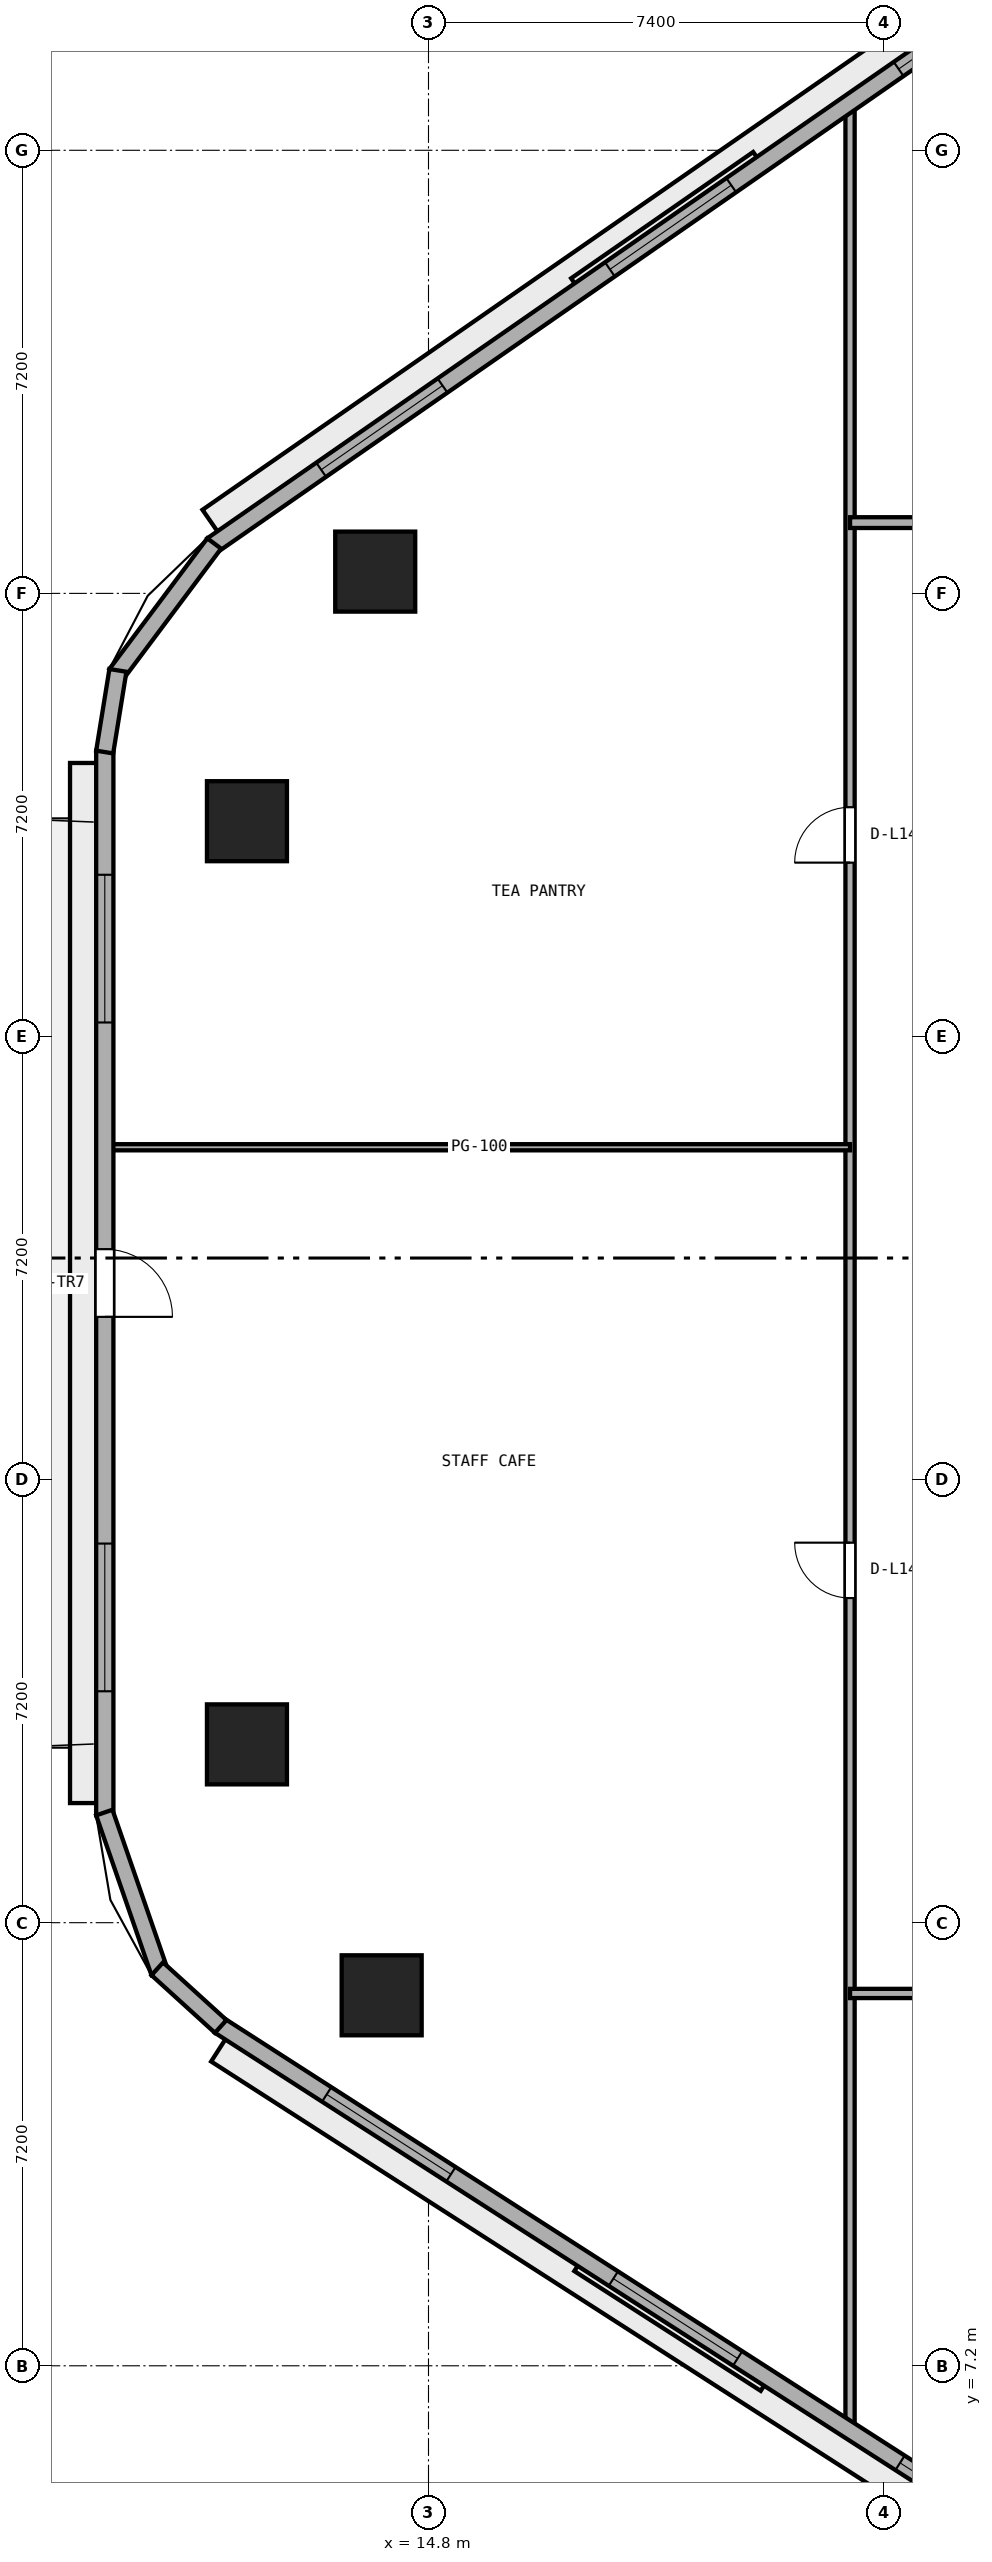
"""IFC4 building model, lengths in metres.
Left out: names, types, materials, properties, quantities, classifications, styles, units other than length and angle.
Written with IfcOpenShell. Run it as: python <this file> out.ifc"""

import sys

from ifc_helpers import new_model, si_unit, direction, frame, frame_2d, origin, origin_2d, place, context, subcontext, project, spatial, rectangle, extrude, element, fill, save


model = new_model("IFC4")
c1 = context("Model", 3, precision=1e-05, world=origin(), true_north=direction((0.0, 1.0)))
c2 = subcontext(c1, "Body", "Model", "MODEL_VIEW")
j1 = project(units=[si_unit("LENGTHUNIT", "METRE"), si_unit("PLANEANGLEUNIT", "RADIAN")], contexts=[c1])
p1 = place(None, origin())
s1 = spatial("IfcSite", under=j1, at=p1, CompositionType="ELEMENT")
p2 = place(p1, origin())
s2 = spatial("IfcBuilding", under=s1, at=p2, CompositionType="ELEMENT")
p3 = place(p2, frame((0.0, 0.0, 59.2)))
s3 = spatial("IfcBuildingStorey", under=s2, at=p3, CompositionType="ELEMENT", Elevation=59.2)
for number, where, z_axis, x_axis in (
    (1, (13.934, 36.354, 0.0), (0.0, 0.0, 1.0), (1.0, 0.0, 0.0)),
    (2, (11.85, 32.298, 0.0), (0.0, 0.0, 1.0), (1.0, 0.0, 0.0)),
    (3, (11.85, 17.298, 0.0), (0.0, 0.0, 1.0), (1.0, 0.0, 0.0)),
    (4, (14.039, 13.22, 0.0), (0.0, 0.0, 1.0), (1.0, 0.0, 0.0)),
):
    element("IfcColumn", number, at=place(p3, frame(where, z_axis=z_axis, x_axis=x_axis)), inside=s3, PredefinedType="COLUMN", context=c2, shape_type="SweptSolid", body=[
        extrude(rectangle(XDim=1.3, YDim=1.3, at=origin_2d()), origin(), (0.0, 0.0, 1.0), 3.8),
    ])
p4 = place(p3, frame((21.65, 6.119, 0.0), z_axis=(0.0, 0.0, 1.0), x_axis=(0.0, 1.0, 0.0)))
e5 = element("IfcWall", 5, at=p4, inside=s3, PredefinedType="PARTITIONING", context=c2, shape_type="SweptSolid", body=[
    extrude(rectangle(XDim=37.884, YDim=0.15, at=frame_2d((18.942, 0.0))), origin(), (0.0, 0.0, 1.0), 3.525),
])
p5 = place(p4, frame((13.556, 0.0, 0.0)))
e6 = element("IfcOpeningElement", 6, at=p5, cuts=e5, PredefinedType="OPENING", context=c2, shape_type="SweptSolid", body=[
    extrude(rectangle(XDim=0.9, YDim=2.1, at=frame_2d((0.45, 1.05))), frame((0.0, 0.085, 0.0), z_axis=(0.0, -1.0, 0.0), x_axis=(1.0, 0.0, 0.0)), (0.0, 0.0, 1.0), 0.17),
])
p6 = place(p4, frame((25.506, 0.0, 0.0)))
e7 = element("IfcOpeningElement", 7, at=p6, cuts=e5, PredefinedType="OPENING", context=c2, shape_type="SweptSolid", body=[
    extrude(rectangle(XDim=0.9, YDim=2.1, at=frame_2d((0.45, 1.05))), frame((0.0, 0.085, 0.0), z_axis=(0.0, -1.0, 0.0), x_axis=(1.0, 0.0, 0.0)), (0.0, 0.0, 1.0), 0.17),
])
p7 = place(p3, frame((21.65, 13.25, 0.0), z_axis=(0.0, 0.0, 1.0), x_axis=(1.0, 0.0, 0.0)))
e8 = element("IfcWall", 8, at=p7, inside=s3, PredefinedType="PARTITIONING", context=c2, shape_type="SweptSolid", body=[
    extrude(rectangle(XDim=30.7, YDim=0.15, at=frame_2d((15.35, 0.0))), origin(), (0.0, 0.0, 1.0), 3.525),
])
p8 = place(p7, frame((3.695, 0.0, 0.0)))
e9 = element("IfcOpeningElement", 9, at=p8, cuts=e8, PredefinedType="OPENING", context=c2, shape_type="SweptSolid", body=[
    extrude(rectangle(XDim=0.9, YDim=2.1, at=frame_2d((0.45, 1.05))), frame((0.0, 0.085, 0.0), z_axis=(0.0, -1.0, 0.0), x_axis=(1.0, 0.0, 0.0)), (0.0, 0.0, 1.0), 0.17),
])
p9 = place(p7, frame((11.95, 0.0, 0.0)))
e10 = element("IfcOpeningElement", 10, at=p9, cuts=e8, PredefinedType="OPENING", context=c2, shape_type="SweptSolid", body=[
    extrude(rectangle(XDim=0.9, YDim=2.1, at=frame_2d((0.45, 1.05))), frame((0.0, 0.085, 0.0), z_axis=(0.0, -1.0, 0.0), x_axis=(1.0, 0.0, 0.0)), (0.0, 0.0, 1.0), 0.17),
])
p10 = place(p7, frame((20.45, 0.0, 0.0)))
e11 = element("IfcOpeningElement", 11, at=p10, cuts=e8, PredefinedType="OPENING", context=c2, shape_type="SweptSolid", body=[
    extrude(rectangle(XDim=0.9, YDim=2.1, at=frame_2d((0.45, 1.05))), frame((0.0, 0.085, 0.0), z_axis=(0.0, -1.0, 0.0), x_axis=(1.0, 0.0, 0.0)), (0.0, 0.0, 1.0), 0.17),
])
p11 = place(p7, frame((27.305, 0.0, 0.0)))
e12 = element("IfcOpeningElement", 12, at=p11, cuts=e8, PredefinedType="OPENING", context=c2, shape_type="SweptSolid", body=[
    extrude(rectangle(XDim=0.9, YDim=2.1, at=frame_2d((0.45, 1.05))), frame((0.0, 0.085, 0.0), z_axis=(0.0, -1.0, 0.0), x_axis=(1.0, 0.0, 0.0)), (0.0, 0.0, 1.0), 0.17),
])
p12 = place(p3, frame((9.605, 27.0, 0.0), z_axis=(0.0, 0.0, 1.0), x_axis=(1.0, 0.0, 0.0)))
e13 = element("IfcWall", 13, at=p12, inside=s3, PredefinedType="PARTITIONING", context=c2, shape_type="SweptSolid", body=[
    extrude(rectangle(XDim=12.045, YDim=0.1, at=frame_2d((6.022, 0.0))), origin(), (0.0, 0.0, 1.0), 3.525),
])
p13 = place(p3, frame((21.65, 37.15, 0.0), z_axis=(0.0, 0.0, 1.0), x_axis=(1.0, 0.0, 0.0)))
e14 = element("IfcWall", 14, at=p13, inside=s3, PredefinedType="PARTITIONING", context=c2, shape_type="SweptSolid", body=[
    extrude(rectangle(XDim=30.7, YDim=0.175, at=frame_2d((15.35, 0.0))), origin(), (0.0, 0.0, 1.0), 3.525),
])
p14 = place(p13, frame((3.795, 0.0, 0.0)))
e15 = element("IfcOpeningElement", 15, at=p14, cuts=e14, PredefinedType="OPENING", context=c2, shape_type="SweptSolid", body=[
    extrude(rectangle(XDim=1.0, YDim=2.12, at=frame_2d((0.5, 1.06))), frame((0.0, 0.097, 0.0), z_axis=(0.0, -1.0, 0.0), x_axis=(1.0, 0.0, 0.0)), (0.0, 0.0, 1.0), 0.195),
])
p15 = place(p13, frame((18.905, 0.0, 0.0)))
e16 = element("IfcOpeningElement", 16, at=p15, cuts=e14, PredefinedType="OPENING", context=c2, shape_type="SweptSolid", body=[
    extrude(rectangle(XDim=1.0, YDim=2.12, at=frame_2d((0.5, 1.06))), frame((0.0, 0.097, 0.0), z_axis=(0.0, -1.0, 0.0), x_axis=(1.0, 0.0, 0.0)), (0.0, 0.0, 1.0), 0.195),
])
p16 = place(p3, frame((26.182, 47.118, 0.0), z_axis=(0.0, 0.0, 1.0), x_axis=(-0.821547956627, -0.570139417127, 0.0)))
e17 = element("IfcWall", 17, at=p16, inside=s3, PredefinedType="STANDARD", context=c2, shape_type="SweptSolid", body=[
    extrude(rectangle(XDim=18.132, YDim=0.28, at=frame_2d((9.066, 0.0))), origin(), (0.0, 0.0, 1.0), 3.525),
])
p17 = place(p16, frame((2.156, 0.0, 0.9)))
e18 = element("IfcOpeningElement", 18, at=p17, cuts=e17, PredefinedType="OPENING", context=c2, shape_type="SweptSolid", body=[
    extrude(rectangle(XDim=2.4, YDim=1.75, at=frame_2d((1.2, 0.875))), frame((0.0, 0.15, 0.0), z_axis=(0.0, -1.0, 0.0), x_axis=(1.0, 0.0, 0.0)), (0.0, 0.0, 1.0), 0.3),
])
p18 = place(p16, frame((7.866, 0.0, 0.9)))
e19 = element("IfcOpeningElement", 19, at=p18, cuts=e17, PredefinedType="OPENING", context=c2, shape_type="SweptSolid", body=[
    extrude(rectangle(XDim=2.4, YDim=1.75, at=frame_2d((1.2, 0.875))), frame((0.0, 0.15, 0.0), z_axis=(0.0, -1.0, 0.0), x_axis=(1.0, 0.0, 0.0)), (0.0, 0.0, 1.0), 0.3),
])
p19 = place(p16, frame((13.577, 0.0, 0.9)))
e20 = element("IfcOpeningElement", 20, at=p19, cuts=e17, PredefinedType="OPENING", context=c2, shape_type="SweptSolid", body=[
    extrude(rectangle(XDim=2.4, YDim=1.75, at=frame_2d((1.2, 0.875))), frame((0.0, 0.15, 0.0), z_axis=(0.0, -1.0, 0.0), x_axis=(1.0, 0.0, 0.0)), (0.0, 0.0, 1.0), 0.3),
])
p20 = place(p3, frame((9.54, 33.444, 0.0), z_axis=(0.0, 0.0, 1.0), x_axis=(0.0, -1.0, 0.0)))
e21 = element("IfcWall", 21, at=p20, inside=s3, PredefinedType="STANDARD", context=c2, shape_type="SweptSolid", body=[
    extrude(rectangle(XDim=17.301, YDim=0.28, at=frame_2d((8.65, 0.0))), origin(), (0.0, 0.0, 1.0), 3.525),
])
p21 = place(p20, frame((8.1, 0.0, 0.0)))
e22 = element("IfcOpeningElement", 22, at=p21, cuts=e21, PredefinedType="OPENING", context=c2, shape_type="SweptSolid", body=[
    extrude(rectangle(XDim=1.1, YDim=2.2, at=frame_2d((0.55, 1.1))), frame((0.0, 0.15, 0.0), z_axis=(0.0, -1.0, 0.0), x_axis=(1.0, 0.0, 0.0)), (0.0, 0.0, 1.0), 0.3),
])
p22 = place(p20, frame((2.017, 0.0, 0.9)))
e23 = element("IfcOpeningElement", 23, at=p22, cuts=e21, PredefinedType="OPENING", context=c2, shape_type="SweptSolid", body=[
    extrude(rectangle(XDim=2.4, YDim=1.75, at=frame_2d((1.2, 0.875))), frame((0.0, 0.15, 0.0), z_axis=(0.0, -1.0, 0.0), x_axis=(1.0, 0.0, 0.0)), (0.0, 0.0, 1.0), 0.3),
])
p23 = place(p20, frame((12.884, 0.0, 0.9)))
e24 = element("IfcOpeningElement", 24, at=p23, cuts=e21, PredefinedType="OPENING", context=c2, shape_type="SweptSolid", body=[
    extrude(rectangle(XDim=2.4, YDim=1.75, at=frame_2d((1.2, 0.875))), frame((0.0, 0.15, 0.0), z_axis=(0.0, -1.0, 0.0), x_axis=(1.0, 0.0, 0.0)), (0.0, 0.0, 1.0), 0.3),
])
p24 = place(p3, frame((11.405, 12.728, 0.0), z_axis=(0.0, 0.0, 1.0), x_axis=(0.841304564637, -0.540561402175, 0.0)))
e25 = element("IfcWall", 25, at=p24, inside=s3, PredefinedType="STANDARD", context=c2, shape_type="SweptSolid", body=[
    extrude(rectangle(XDim=17.612, YDim=0.28, at=frame_2d((8.806, 0.0))), origin(), (0.0, 0.0, 1.0), 3.525),
])
p25 = place(p24, frame((2.069, 0.0, 0.9)))
e26 = element("IfcOpeningElement", 26, at=p25, cuts=e25, PredefinedType="OPENING", context=c2, shape_type="SweptSolid", body=[
    extrude(rectangle(XDim=2.4, YDim=1.75, at=frame_2d((1.2, 0.875))), frame((0.0, 0.15, 0.0), z_axis=(0.0, -1.0, 0.0), x_axis=(1.0, 0.0, 0.0)), (0.0, 0.0, 1.0), 0.3),
])
p26 = place(p24, frame((7.606, 0.0, 0.9)))
e27 = element("IfcOpeningElement", 27, at=p26, cuts=e25, PredefinedType="OPENING", context=c2, shape_type="SweptSolid", body=[
    extrude(rectangle(XDim=2.4, YDim=1.75, at=frame_2d((1.2, 0.875))), frame((0.0, 0.15, 0.0), z_axis=(0.0, -1.0, 0.0), x_axis=(1.0, 0.0, 0.0)), (0.0, 0.0, 1.0), 0.3),
])
p27 = place(p24, frame((13.143, 0.0, 0.9)))
e28 = element("IfcOpeningElement", 28, at=p27, cuts=e25, PredefinedType="OPENING", context=c2, shape_type="SweptSolid", body=[
    extrude(rectangle(XDim=2.4, YDim=1.75, at=frame_2d((1.2, 0.875))), frame((0.0, 0.15, 0.0), z_axis=(0.0, -1.0, 0.0), x_axis=(1.0, 0.0, 0.0)), (0.0, 0.0, 1.0), 0.3),
])
p28 = place(p3, frame((11.318, 36.811, 0.0), z_axis=(0.0, 0.0, 1.0), x_axis=(-0.599455152629, -0.800408345775, 0.0)))
e29 = element("IfcWall", 29, at=p28, inside=s3, PredefinedType="STANDARD", context=c2, shape_type="SweptSolid", body=[
    extrude(rectangle(XDim=2.653, YDim=0.28, at=frame_2d((1.327, 0.0))), origin(), (0.0, 0.0, 1.0), 3.525),
])
p29 = place(p3, frame((9.753, 34.749, 0.0), z_axis=(0.0, 0.0, 1.0), x_axis=(-0.160037671962, -0.987110907423, 0.0)))
e30 = element("IfcWall", 30, at=p29, inside=s3, PredefinedType="STANDARD", context=c2, shape_type="SweptSolid", body=[
    extrude(rectangle(XDim=1.344, YDim=0.28, at=frame_2d((0.672, 0.0))), origin(), (0.0, 0.0, 1.0), 3.525),
])
p30 = place(p3, frame((9.532, 16.189, 0.0), z_axis=(0.0, 0.0, 1.0), x_axis=(0.32708309668, -0.944995580871, 0.0)))
e31 = element("IfcWall", 31, at=p30, inside=s3, PredefinedType="STANDARD", context=c2, shape_type="SweptSolid", body=[
    extrude(rectangle(XDim=2.748, YDim=0.28, at=frame_2d((1.374, 0.0))), origin(), (0.0, 0.0, 1.0), 3.525),
])
p31 = place(p3, frame((10.393, 13.651, 0.0), z_axis=(0.0, 0.0, 1.0), x_axis=(0.74003521851, -0.672568119498, 0.0)))
e32 = element("IfcWall", 32, at=p31, inside=s3, PredefinedType="STANDARD", context=c2, shape_type="SweptSolid", body=[
    extrude(rectangle(XDim=1.393, YDim=0.28, at=frame_2d((0.697, 0.0))), origin(), (0.0, 0.0, 1.0), 3.525),
])
p32 = place(p5, origin())
e33 = element("IfcDoor", 33, at=p32, inside=s3, OperationType="SINGLE_SWING_RIGHT", PredefinedType="DOOR", context=c2, shape_type="SweptSolid", body=[
    extrude(rectangle(XDim=0.9, YDim=2.1, at=frame_2d((0.45, 1.05))), frame((0.0, 0.025, 0.0), z_axis=(0.0, -1.0, 0.0), x_axis=(1.0, 0.0, 0.0)), (0.0, 0.0, 1.0), 0.05),
])
fill(e6, e33)
p33 = place(p6, origin())
e34 = element("IfcDoor", 34, at=p33, inside=s3, OperationType="SINGLE_SWING_LEFT", PredefinedType="DOOR", context=c2, shape_type="SweptSolid", body=[
    extrude(rectangle(XDim=0.9, YDim=2.1, at=frame_2d((0.45, 1.05))), frame((0.0, 0.025, 0.0), z_axis=(0.0, -1.0, 0.0), x_axis=(1.0, 0.0, 0.0)), (0.0, 0.0, 1.0), 0.05),
])
fill(e7, e34)
p34 = place(p17, origin())
e35 = element("IfcWindow", 35, at=p34, inside=s3, PartitioningType="SINGLE_PANEL", PredefinedType="WINDOW", context=c2, shape_type="SweptSolid", body=[
    extrude(rectangle(XDim=2.4, YDim=1.75, at=frame_2d((1.2, 0.875))), frame((0.0, 0.03, 0.0), z_axis=(0.0, -1.0, 0.0), x_axis=(1.0, 0.0, 0.0)), (0.0, 0.0, 1.0), 0.06),
])
fill(e18, e35)
p35 = place(p18, origin())
e36 = element("IfcWindow", 36, at=p35, inside=s3, PartitioningType="SINGLE_PANEL", PredefinedType="WINDOW", context=c2, shape_type="SweptSolid", body=[
    extrude(rectangle(XDim=2.4, YDim=1.75, at=frame_2d((1.2, 0.875))), frame((0.0, 0.03, 0.0), z_axis=(0.0, -1.0, 0.0), x_axis=(1.0, 0.0, 0.0)), (0.0, 0.0, 1.0), 0.06),
])
fill(e19, e36)
p36 = place(p19, origin())
e37 = element("IfcWindow", 37, at=p36, inside=s3, PartitioningType="SINGLE_PANEL", PredefinedType="WINDOW", context=c2, shape_type="SweptSolid", body=[
    extrude(rectangle(XDim=2.4, YDim=1.75, at=frame_2d((1.2, 0.875))), frame((0.0, 0.03, 0.0), z_axis=(0.0, -1.0, 0.0), x_axis=(1.0, 0.0, 0.0)), (0.0, 0.0, 1.0), 0.06),
])
fill(e20, e37)
p37 = place(p21, origin())
e38 = element("IfcDoor", 38, at=p37, inside=s3, OperationType="SINGLE_SWING_RIGHT", PredefinedType="DOOR", context=c2, shape_type="SweptSolid", body=[
    extrude(rectangle(XDim=1.1, YDim=2.2, at=frame_2d((0.55, 1.1))), frame((0.0, 0.025, 0.0), z_axis=(0.0, -1.0, 0.0), x_axis=(1.0, 0.0, 0.0)), (0.0, 0.0, 1.0), 0.05),
])
fill(e22, e38)
p38 = place(p22, origin())
e39 = element("IfcWindow", 39, at=p38, inside=s3, PartitioningType="SINGLE_PANEL", PredefinedType="WINDOW", context=c2, shape_type="SweptSolid", body=[
    extrude(rectangle(XDim=2.4, YDim=1.75, at=frame_2d((1.2, 0.875))), frame((0.0, 0.03, 0.0), z_axis=(0.0, -1.0, 0.0), x_axis=(1.0, 0.0, 0.0)), (0.0, 0.0, 1.0), 0.06),
])
fill(e23, e39)
p39 = place(p23, origin())
e40 = element("IfcWindow", 40, at=p39, inside=s3, PartitioningType="SINGLE_PANEL", PredefinedType="WINDOW", context=c2, shape_type="SweptSolid", body=[
    extrude(rectangle(XDim=2.4, YDim=1.75, at=frame_2d((1.2, 0.875))), frame((0.0, 0.03, 0.0), z_axis=(0.0, -1.0, 0.0), x_axis=(1.0, 0.0, 0.0)), (0.0, 0.0, 1.0), 0.06),
])
fill(e24, e40)
p40 = place(p25, origin())
e41 = element("IfcWindow", 41, at=p40, inside=s3, PartitioningType="SINGLE_PANEL", PredefinedType="WINDOW", context=c2, shape_type="SweptSolid", body=[
    extrude(rectangle(XDim=2.4, YDim=1.75, at=frame_2d((1.2, 0.875))), frame((0.0, 0.03, 0.0), z_axis=(0.0, -1.0, 0.0), x_axis=(1.0, 0.0, 0.0)), (0.0, 0.0, 1.0), 0.06),
])
fill(e26, e41)
p41 = place(p26, origin())
e42 = element("IfcWindow", 42, at=p41, inside=s3, PartitioningType="SINGLE_PANEL", PredefinedType="WINDOW", context=c2, shape_type="SweptSolid", body=[
    extrude(rectangle(XDim=2.4, YDim=1.75, at=frame_2d((1.2, 0.875))), frame((0.0, 0.03, 0.0), z_axis=(0.0, -1.0, 0.0), x_axis=(1.0, 0.0, 0.0)), (0.0, 0.0, 1.0), 0.06),
])
fill(e27, e42)
p42 = place(p27, origin())
e43 = element("IfcWindow", 43, at=p42, inside=s3, PartitioningType="SINGLE_PANEL", PredefinedType="WINDOW", context=c2, shape_type="SweptSolid", body=[
    extrude(rectangle(XDim=2.4, YDim=1.75, at=frame_2d((1.2, 0.875))), frame((0.0, 0.03, 0.0), z_axis=(0.0, -1.0, 0.0), x_axis=(1.0, 0.0, 0.0)), (0.0, 0.0, 1.0), 0.06),
])
fill(e28, e43)
save(model, sys.argv[1])
